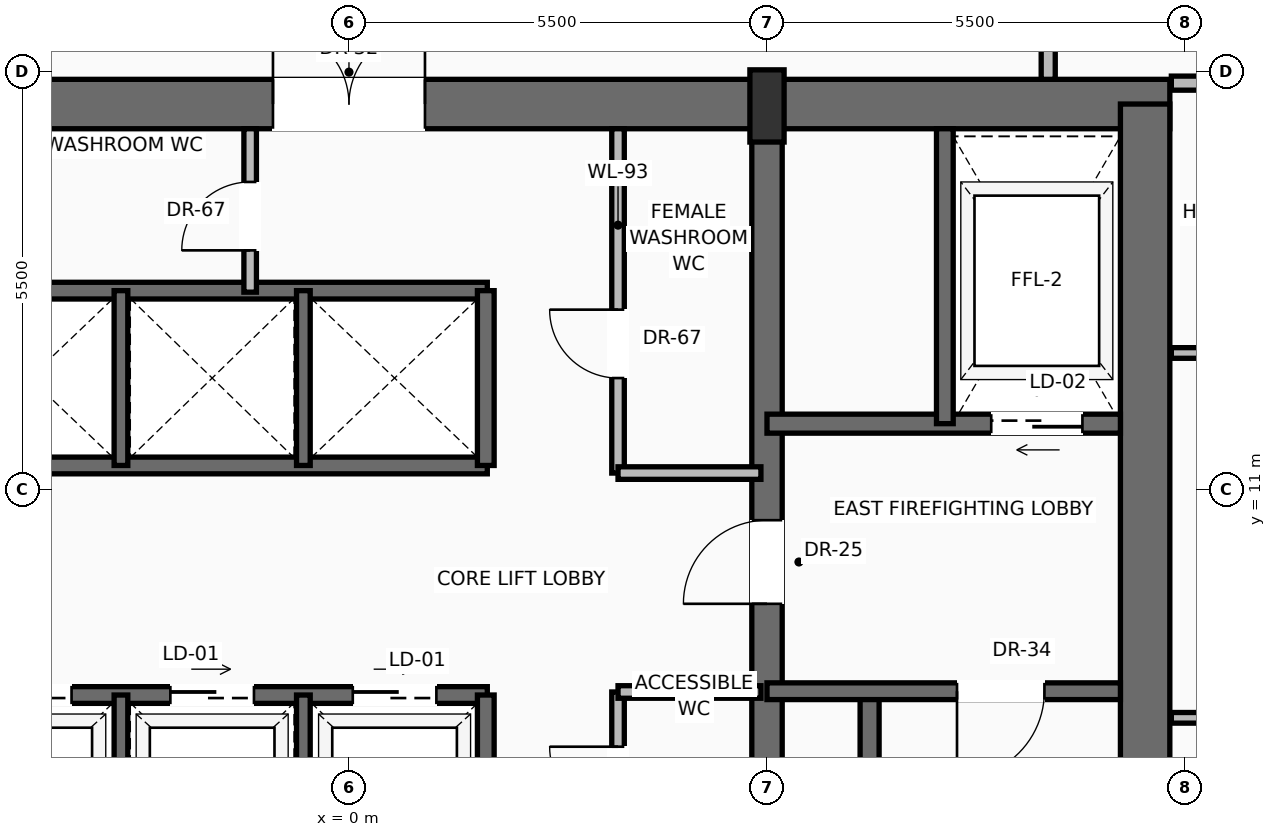
"""IFC4 building model, lengths in metres.
Left out: names, types, materials, properties, quantities, classifications, styles, units other than length and angle.
Written with IfcOpenShell. Run it as: python <this file> out.ifc"""

import sys

from ifc_helpers import new_model, si_unit, direction, frame, frame_2d, origin, origin_2d, place, context, subcontext, project, spatial, rectangle, extrude, source, transform, mapped, element, fill, save


model = new_model("IFC4")
c1 = context("Model", 3, precision=1e-05, world=origin(), true_north=direction((0.0, 1.0)))
c2 = subcontext(c1, "Body", "Model", "MODEL_VIEW")
j1 = project(units=[si_unit("LENGTHUNIT", "METRE"), si_unit("PLANEANGLEUNIT", "RADIAN")], contexts=[c1])
p1 = place(None, origin())
s1 = spatial("IfcSite", under=j1, at=p1, CompositionType="ELEMENT")
p2 = place(p1, origin())
s2 = spatial("IfcBuilding", under=s1, at=p2, CompositionType="ELEMENT")
p3 = place(p2, frame((0.0, 0.0, 208.0)))
s3 = spatial("IfcBuildingStorey", under=s2, at=p3, CompositionType="ELEMENT", Elevation=208.0)
p4 = place(p3, frame((-10.8, 16.075, 0.0), z_axis=(0.0, 0.0, 1.0), x_axis=(1.0, 0.0, 0.0)))
e1 = element("IfcWall", 1, at=p4, inside=s3, PredefinedType="SHEAR", context=c2, shape_type="SweptSolid", body=[
    extrude(rectangle(XDim=21.6, YDim=0.65, at=frame_2d((10.8, 0.0))), origin(), (0.0, 0.0, 1.0), 3.47),
])
p5 = place(p4, frame((3.37, 0.0, 0.0)))
e2 = element("IfcOpeningElement", 2, at=p5, cuts=e1, PredefinedType="OPENING", context=c2, shape_type="SweptSolid", body=[
    extrude(rectangle(XDim=1.3, YDim=2.3, at=frame_2d((0.65, 1.15))), frame((0.0, 0.335, 0.0), z_axis=(0.0, -1.0, 0.0), x_axis=(1.0, 0.0, 0.0)), (0.0, 0.0, 1.0), 0.67),
])
p6 = place(p4, frame((9.8, 0.0, 0.0)))
e3 = element("IfcOpeningElement", 3, at=p6, cuts=e1, PredefinedType="OPENING", context=c2, shape_type="SweptSolid", body=[
    extrude(rectangle(XDim=2.0, YDim=2.4, at=frame_2d((1.0, 1.2))), frame((0.0, 0.335, 0.0), z_axis=(0.0, -1.0, 0.0), x_axis=(1.0, 0.0, 0.0)), (0.0, 0.0, 1.0), 0.67),
])
p7 = place(p3, frame((10.475, 0.525, 0.0), z_axis=(0.0, 0.0, 1.0), x_axis=(0.0, 1.0, 0.0)))
e4 = element("IfcWall", 4, at=p7, inside=s3, PredefinedType="SHEAR", context=c2, shape_type="SweptSolid", body=[
    extrude(rectangle(XDim=15.55, YDim=0.65, at=frame_2d((7.775, 0.0))), origin(), (0.0, 0.0, 1.0), 3.47),
])
p8 = place(p3, frame((5.5, 0.525, 0.0), z_axis=(0.0, 0.0, 1.0), x_axis=(0.0, 1.0, 0.0)))
e5 = element("IfcWall", 5, at=p8, inside=s3, PredefinedType="SHEAR", context=c2, shape_type="SweptSolid", body=[
    extrude(rectangle(XDim=15.55, YDim=0.4, at=frame_2d((7.775, 0.0))), origin(), (0.0, 0.0, 1.0), 3.47),
])
p9 = place(p8, frame((8.975, 0.0, 0.0)))
e6 = element("IfcOpeningElement", 6, at=p9, cuts=e5, PredefinedType="OPENING", context=c2, shape_type="SweptSolid", body=[
    extrude(rectangle(XDim=1.1, YDim=2.2, at=frame_2d((0.55, 1.1))), frame((0.0, 0.21, 0.0), z_axis=(0.0, -1.0, 0.0), x_axis=(1.0, 0.0, 0.0)), (0.0, 0.0, 1.0), 0.42),
])
m1 = source(origin(), c2, "Body", "SweptSolid", [
    extrude(rectangle(XDim=0.45, YDim=0.95, at=origin_2d()), origin(), (0.0, 0.0, 1.0), 3.7),
])
p10 = place(p3, frame((5.5, 16.05, 0.0), z_axis=(0.0, 0.0, 1.0), x_axis=(1.0, 0.0, 0.0)))
e7 = element("IfcColumn", 7, at=p10, inside=s3, PredefinedType="PILASTER", context=c2, shape_type="MappedRepresentation", body=[
    mapped(m1, transform((0.0, 0.0, 0.0), scale=1.0)),
])
p11 = place(p3, frame((9.318, 32.292, 0.0), z_axis=(0.0, 0.0, 1.0), x_axis=(0.532974477416, -0.846131317482, 0.0)))
e8 = element("IfcWall", 8, at=p11, inside=s3, PredefinedType="SOLIDWALL", context=c2, shape_type="SweptSolid", body=[
    extrude(rectangle(XDim=19.199, YDim=0.28, at=frame_2d((9.599, 0.0))), origin(), (0.0, 0.0, 1.0), 3.05),
])
p12 = place(p11, frame((4.608, 0.0, 0.0)))
e9 = element("IfcOpeningElement", 9, at=p12, cuts=e8, PredefinedType="OPENING", context=c2, shape_type="SweptSolid", body=[
    extrude(rectangle(XDim=1.6, YDim=2.35, at=frame_2d((0.8, 1.175))), frame((0.0, 0.15, 0.0), z_axis=(0.0, -1.0, 0.0), x_axis=(1.0, 0.0, 0.0)), (0.0, 0.0, 1.0), 0.3),
])
p13 = place(p11, frame((13.055, 0.0, 0.9)))
e10 = element("IfcOpeningElement", 10, at=p13, cuts=e8, PredefinedType="OPENING", context=c2, shape_type="SweptSolid", body=[
    extrude(rectangle(XDim=1.55, YDim=1.85, at=frame_2d((0.775, 0.925))), frame((0.0, 0.15, 0.0), z_axis=(0.0, -1.0, 0.0), x_axis=(1.0, 0.0, 0.0)), (0.0, 0.0, 1.0), 0.3),
])
p14 = place(p3, frame((6.85, 0.85, 0.0), z_axis=(0.0, 0.0, 1.0), x_axis=(0.0, 1.0, 0.0)))
e11 = element("IfcWall", 11, at=p14, inside=s3, PredefinedType="SOLIDWALL", context=c2, shape_type="SweptSolid", body=[
    extrude(rectangle(XDim=7.5, YDim=0.25, at=frame_2d((3.75, 0.0))), origin(), (0.0, 0.0, 1.0), 3.47),
])
p15 = place(p3, frame((10.15, 8.35, 0.0), z_axis=(0.0, 0.0, 1.0), x_axis=(-1.0, 0.0, 0.0)))
e12 = element("IfcWall", 12, at=p15, inside=s3, PredefinedType="SOLIDWALL", context=c2, shape_type="SweptSolid", body=[
    extrude(rectangle(XDim=4.65, YDim=0.22, at=frame_2d((2.325, 0.0))), origin(), (0.0, 0.0, 1.0), 3.47),
])
p16 = place(p15, frame((1.0, 0.0, 0.0)))
e13 = element("IfcOpeningElement", 13, at=p16, cuts=e12, PredefinedType="OPENING", context=c2, shape_type="SweptSolid", body=[
    extrude(rectangle(XDim=1.15, YDim=2.2, at=frame_2d((0.575, 1.1))), frame((0.0, 0.12, 0.0), z_axis=(0.0, -1.0, 0.0), x_axis=(1.0, 0.0, 0.0)), (0.0, 0.0, 1.0), 0.24),
])
p17 = place(p3, frame((10.15, 11.87, 0.0), z_axis=(0.0, 0.0, 1.0), x_axis=(-1.0, 0.0, 0.0)))
e14 = element("IfcWall", 14, at=p17, inside=s3, PredefinedType="SOLIDWALL", context=c2, shape_type="SweptSolid", body=[
    extrude(rectangle(XDim=4.65, YDim=0.25, at=frame_2d((2.325, 0.0))), origin(), (0.0, 0.0, 1.0), 3.47),
])
p18 = place(p17, frame((0.5, 0.0, 0.0)))
e15 = element("IfcOpeningElement", 15, at=p18, cuts=e14, PredefinedType="OPENING", context=c2, shape_type="SweptSolid", body=[
    extrude(rectangle(XDim=1.2, YDim=2.25, at=frame_2d((0.6, 1.125))), frame((0.0, 0.135, 0.0), z_axis=(0.0, -1.0, 0.0), x_axis=(1.0, 0.0, 0.0)), (0.0, 0.0, 1.0), 0.27),
])
p19 = place(p3, frame((7.84, 11.87, 0.0), z_axis=(0.0, 0.0, 1.0), x_axis=(0.0, 1.0, 0.0)))
e16 = element("IfcWall", 16, at=p19, inside=s3, PredefinedType="SOLIDWALL", context=c2, shape_type="SweptSolid", body=[
    extrude(rectangle(XDim=3.88, YDim=0.22, at=frame_2d((1.94, 0.0))), origin(), (0.0, 0.0, 1.0), 3.47),
])
p20 = place(p3, frame((3.54, 6.0, 0.0), z_axis=(0.0, 0.0, 1.0), x_axis=(0.0, 1.0, 0.0)))
e17 = element("IfcWall", 17, at=p20, inside=s3, PredefinedType="PARTITIONING", context=c2, shape_type="SweptSolid", body=[
    extrude(rectangle(XDim=2.34, YDim=0.165, at=frame_2d((1.17, 0.0))), origin(), (0.0, 0.0, 1.0), 3.462),
])
p21 = place(p20, frame((0.72, 0.0, 0.0)))
e18 = element("IfcOpeningElement", 18, at=p21, cuts=e17, PredefinedType="OPENING", context=c2, shape_type="SweptSolid", body=[
    extrude(rectangle(XDim=0.9, YDim=2.1, at=frame_2d((0.45, 1.05))), frame((0.0, 0.093, 0.0), z_axis=(0.0, -1.0, 0.0), x_axis=(1.0, 0.0, 0.0)), (0.0, 0.0, 1.0), 0.185),
])
p22 = place(p3, frame((3.54, 8.34, 0.0), z_axis=(0.0, 0.0, 1.0), x_axis=(1.0, 0.0, 0.0)))
e19 = element("IfcWall", 19, at=p22, inside=s3, PredefinedType="PARTITIONING", context=c2, shape_type="SweptSolid", body=[
    extrude(rectangle(XDim=1.88, YDim=0.165, at=frame_2d((0.94, 0.0))), origin(), (0.0, 0.0, 1.0), 3.462),
])
p23 = place(p3, frame((-5.5, 8.3, 0.0), z_axis=(0.0, 0.0, 1.0), x_axis=(1.0, 0.0, 0.0)))
e20 = element("IfcWall", 20, at=p23, inside=s3, PredefinedType="SOLIDWALL", context=c2, shape_type="SweptSolid", body=[
    extrude(rectangle(XDim=7.32, YDim=0.22, at=frame_2d((3.66, 0.0))), origin(), (0.0, 0.0, 1.0), 3.47),
])
p24 = place(p23, frame((0.75, 0.0, 0.0)))
e21 = element("IfcOpeningElement", 21, at=p24, cuts=e20, PredefinedType="OPENING", context=c2, shape_type="SweptSolid", body=[
    extrude(rectangle(XDim=1.1, YDim=2.2, at=frame_2d((0.55, 1.1))), frame((0.0, 0.12, 0.0), z_axis=(0.0, -1.0, 0.0), x_axis=(1.0, 0.0, 0.0)), (0.0, 0.0, 1.0), 0.24),
])
p25 = place(p23, frame((3.15, 0.0, 0.0)))
e22 = element("IfcOpeningElement", 22, at=p25, cuts=e20, PredefinedType="OPENING", context=c2, shape_type="SweptSolid", body=[
    extrude(rectangle(XDim=1.1, YDim=2.2, at=frame_2d((0.55, 1.1))), frame((0.0, 0.12, 0.0), z_axis=(0.0, -1.0, 0.0), x_axis=(1.0, 0.0, 0.0)), (0.0, 0.0, 1.0), 0.24),
])
p26 = place(p23, frame((5.55, 0.0, 0.0)))
e23 = element("IfcOpeningElement", 23, at=p26, cuts=e20, PredefinedType="OPENING", context=c2, shape_type="SweptSolid", body=[
    extrude(rectangle(XDim=1.1, YDim=2.2, at=frame_2d((0.55, 1.1))), frame((0.0, 0.12, 0.0), z_axis=(0.0, -1.0, 0.0), x_axis=(1.0, 0.0, 0.0)), (0.0, 0.0, 1.0), 0.24),
])
p27 = place(p3, frame((1.8, 6.0, 0.0), z_axis=(0.0, 0.0, 1.0), x_axis=(0.0, 1.0, 0.0)))
e24 = element("IfcWall", 24, at=p27, inside=s3, PredefinedType="SOLIDWALL", context=c2, shape_type="SweptSolid", body=[
    extrude(rectangle(XDim=2.3, YDim=0.22, at=frame_2d((1.15, 0.0))), origin(), (0.0, 0.0, 1.0), 3.47),
])
for number, where, z_axis, x_axis in (
    (25, (-3.0, 6.0, 0.0), (0.0, 0.0, 1.0), (0.0, 1.0, 0.0)),
    (26, (-0.6, 6.0, 0.0), (0.0, 0.0, 1.0), (0.0, 1.0, 0.0)),
):
    element("IfcWall", number, at=place(p3, frame(where, z_axis=z_axis, x_axis=x_axis)), inside=s3, PredefinedType="SOLIDWALL", context=c2, shape_type="SweptSolid", body=[
        extrude(rectangle(XDim=2.3, YDim=0.18, at=frame_2d((1.15, 0.0))), origin(), (0.0, 0.0, 1.0), 3.47),
    ])
for number, where, z_axis, x_axis in (
    (27, (-5.5, 11.32, 0.0), (0.0, 0.0, 1.0), (1.0, 0.0, 0.0)),
    (28, (-5.5, 13.62, 0.0), (0.0, 0.0, 1.0), (1.0, 0.0, 0.0)),
):
    element("IfcWall", number, at=place(p3, frame(where, z_axis=z_axis, x_axis=x_axis)), inside=s3, PredefinedType="SOLIDWALL", context=c2, shape_type="SweptSolid", body=[
        extrude(rectangle(XDim=7.32, YDim=0.22, at=frame_2d((3.66, 0.0))), origin(), (0.0, 0.0, 1.0), 3.47),
    ])
p28 = place(p3, frame((1.8, 11.32, 0.0), z_axis=(0.0, 0.0, 1.0), x_axis=(0.0, 1.0, 0.0)))
e29 = element("IfcWall", 29, at=p28, inside=s3, PredefinedType="SOLIDWALL", context=c2, shape_type="SweptSolid", body=[
    extrude(rectangle(XDim=2.3, YDim=0.22, at=frame_2d((1.15, 0.0))), origin(), (0.0, 0.0, 1.0), 3.47),
])
for number, where, z_axis, x_axis in (
    (30, (-3.0, 11.32, 0.0), (0.0, 0.0, 1.0), (0.0, 1.0, 0.0)),
    (31, (-0.6, 11.32, 0.0), (0.0, 0.0, 1.0), (0.0, 1.0, 0.0)),
):
    element("IfcWall", number, at=place(p3, frame(where, z_axis=z_axis, x_axis=x_axis)), inside=s3, PredefinedType="SOLIDWALL", context=c2, shape_type="SweptSolid", body=[
        extrude(rectangle(XDim=2.3, YDim=0.18, at=frame_2d((1.15, 0.0))), origin(), (0.0, 0.0, 1.0), 3.47),
    ])
p29 = place(p3, frame((-1.3, 13.6, 0.0), z_axis=(0.0, 0.0, 1.0), x_axis=(0.0, 1.0, 0.0)))
e32 = element("IfcWall", 32, at=p29, inside=s3, PredefinedType="PARTITIONING", context=c2, shape_type="SweptSolid", body=[
    extrude(rectangle(XDim=2.15, YDim=0.165, at=frame_2d((1.075, 0.0))), origin(), (0.0, 0.0, 1.0), 3.462),
])
p30 = place(p29, frame((0.55, 0.0, 0.0)))
e33 = element("IfcOpeningElement", 33, at=p30, cuts=e32, PredefinedType="OPENING", context=c2, shape_type="SweptSolid", body=[
    extrude(rectangle(XDim=0.9, YDim=2.1, at=frame_2d((0.45, 1.05))), frame((0.0, 0.093, 0.0), z_axis=(0.0, -1.0, 0.0), x_axis=(1.0, 0.0, 0.0)), (0.0, 0.0, 1.0), 0.185),
])
p31 = place(p3, frame((3.54, 11.22, 0.0), z_axis=(0.0, 0.0, 1.0), x_axis=(0.0, 1.0, 0.0)))
e34 = element("IfcWall", 34, at=p31, inside=s3, PredefinedType="PARTITIONING", context=c2, shape_type="SweptSolid", body=[
    extrude(rectangle(XDim=4.53, YDim=0.165, at=frame_2d((2.265, 0.0))), origin(), (0.0, 0.0, 1.0), 3.462),
])
p32 = place(p31, frame((1.25, 0.0, 0.0)))
e35 = element("IfcOpeningElement", 35, at=p32, cuts=e34, PredefinedType="OPENING", context=c2, shape_type="SweptSolid", body=[
    extrude(rectangle(XDim=0.9, YDim=2.1, at=frame_2d((0.45, 1.05))), frame((0.0, 0.093, 0.0), z_axis=(0.0, -1.0, 0.0), x_axis=(1.0, 0.0, 0.0)), (0.0, 0.0, 1.0), 0.185),
])
p33 = place(p3, frame((3.54, 11.22, 0.0), z_axis=(0.0, 0.0, 1.0), x_axis=(1.0, 0.0, 0.0)))
e36 = element("IfcWall", 36, at=p33, inside=s3, PredefinedType="PARTITIONING", context=c2, shape_type="SweptSolid", body=[
    extrude(rectangle(XDim=1.88, YDim=0.165, at=frame_2d((0.94, 0.0))), origin(), (0.0, 0.0, 1.0), 3.462),
])
p34 = place(p3, frame((9.2, 16.4, 0.0), z_axis=(0.0, 0.0, 1.0), x_axis=(0.0, 1.0, 0.0)))
e37 = element("IfcWall", 37, at=p34, inside=s3, PredefinedType="PARTITIONING", context=c2, shape_type="SweptSolid", body=[
    extrude(rectangle(XDim=7.4, YDim=0.185, at=frame_2d((3.7, 0.0))), origin(), (0.0, 0.0, 1.0), 3.462),
])
p35 = place(p34, frame((3.561, 0.0, 0.0)))
e38 = element("IfcOpeningElement", 38, at=p35, cuts=e37, PredefinedType="OPENING", context=c2, shape_type="SweptSolid", body=[
    extrude(rectangle(XDim=0.95, YDim=2.2, at=frame_2d((0.475, 1.1))), frame((0.0, 0.103, 0.0), z_axis=(0.0, -1.0, 0.0), x_axis=(1.0, 0.0, 0.0)), (0.0, 0.0, 1.0), 0.205),
])
p36 = place(p34, frame((1.457, 0.0, 0.0)))
e39 = element("IfcOpeningElement", 39, at=p36, cuts=e37, PredefinedType="OPENING", context=c2, shape_type="SweptSolid", body=[
    extrude(rectangle(XDim=0.95, YDim=2.2, at=frame_2d((0.475, 1.1))), frame((0.0, 0.103, 0.0), z_axis=(0.0, -1.0, 0.0), x_axis=(1.0, 0.0, 0.0)), (0.0, 0.0, 1.0), 0.205),
])
p37 = place(p3, frame((10.82, 16.35, 0.0), z_axis=(0.0, 0.0, 1.0), x_axis=(1.0, 0.0, 0.0)))
e40 = element("IfcWall", 40, at=p37, inside=s3, PredefinedType="PARTITIONING", context=c2, shape_type="SweptSolid", body=[
    extrude(rectangle(XDim=8.693, YDim=0.185, at=frame_2d((4.347, 0.0))), origin(), (0.0, 0.0, 1.0), 3.462),
])
p38 = place(p37, frame((2.67, 0.0, 0.0)))
e41 = element("IfcOpeningElement", 41, at=p38, cuts=e40, PredefinedType="OPENING", context=c2, shape_type="SweptSolid", body=[
    extrude(rectangle(XDim=0.95, YDim=2.2, at=frame_2d((0.475, 1.1))), frame((0.0, 0.103, 0.0), z_axis=(0.0, -1.0, 0.0), x_axis=(1.0, 0.0, 0.0)), (0.0, 0.0, 1.0), 0.205),
])
p39 = place(p3, frame((10.82, 8.0, 0.0), z_axis=(0.0, 0.0, 1.0), x_axis=(1.0, 0.0, 0.0)))
e42 = element("IfcWall", 42, at=p39, inside=s3, PredefinedType="PARTITIONING", context=c2, shape_type="SweptSolid", body=[
    extrude(rectangle(XDim=13.953, YDim=0.14, at=frame_2d((6.976, 0.0))), origin(), (0.0, 0.0, 1.0), 3.462),
])
p40 = place(p39, frame((6.494, 0.0, 0.0)))
e43 = element("IfcOpeningElement", 43, at=p40, cuts=e42, PredefinedType="OPENING", context=c2, shape_type="SweptSolid", body=[
    extrude(rectangle(XDim=0.95, YDim=2.2, at=frame_2d((0.475, 1.1))), frame((0.0, 0.08, 0.0), z_axis=(0.0, -1.0, 0.0), x_axis=(1.0, 0.0, 0.0)), (0.0, 0.0, 1.0), 0.16),
])
p41 = place(p3, frame((10.82, 12.8, 0.0), z_axis=(0.0, 0.0, 1.0), x_axis=(1.0, 0.0, 0.0)))
e44 = element("IfcWall", 44, at=p41, inside=s3, PredefinedType="PARTITIONING", context=c2, shape_type="SweptSolid", body=[
    extrude(rectangle(XDim=10.929, YDim=0.14, at=frame_2d((5.465, 0.0))), origin(), (0.0, 0.0, 1.0), 3.462),
])
p42 = place(p41, frame((4.982, 0.0, 0.0)))
e45 = element("IfcOpeningElement", 45, at=p42, cuts=e44, PredefinedType="OPENING", context=c2, shape_type="SweptSolid", body=[
    extrude(rectangle(XDim=0.95, YDim=2.2, at=frame_2d((0.475, 1.1))), frame((0.0, 0.08, 0.0), z_axis=(0.0, -1.0, 0.0), x_axis=(1.0, 0.0, 0.0)), (0.0, 0.0, 1.0), 0.16),
])
m2 = source(origin(), c2, "Body", "SweptSolid", [
    extrude(rectangle(XDim=1.15, YDim=2.2, at=frame_2d((0.575, 1.1))), frame((0.0, 0.025, 0.0), z_axis=(0.0, -1.0, 0.0), x_axis=(1.0, 0.0, 0.0)), (0.0, 0.0, 1.0), 0.05),
])
p43 = place(p16, origin())
e46 = element("IfcDoor", 46, at=p43, inside=s3, OperationType="SINGLE_SWING_RIGHT", PredefinedType="DOOR", context=c2, shape_type="MappedRepresentation", body=[
    mapped(m2, transform((0.0, 0.0, 0.0), scale=1.0)),
])
fill(e13, e46)
m3 = source(origin(), c2, "Body", "SweptSolid", [
    extrude(rectangle(XDim=1.1, YDim=2.2, at=frame_2d((0.55, 1.1))), frame((0.0, 0.025, 0.0), z_axis=(0.0, -1.0, 0.0), x_axis=(1.0, 0.0, 0.0)), (0.0, 0.0, 1.0), 0.05),
])
p44 = place(p9, origin())
e47 = element("IfcDoor", 47, at=p44, inside=s3, OperationType="SINGLE_SWING_LEFT", PredefinedType="DOOR", context=c2, shape_type="MappedRepresentation", body=[
    mapped(m3, transform((0.0, 0.0, 0.0), scale=1.0)),
])
fill(e6, e47)
m4 = source(origin(), c2, "Body", "SweptSolid", [
    extrude(rectangle(XDim=1.2, YDim=2.25, at=frame_2d((0.6, 1.125))), frame((0.0, 0.025, 0.0), z_axis=(0.0, -1.0, 0.0), x_axis=(1.0, 0.0, 0.0)), (0.0, 0.0, 1.0), 0.05),
])
p45 = place(p18, origin())
e48 = element("IfcDoor", 48, at=p45, inside=s3, OperationType="SLIDING_TO_RIGHT", PredefinedType="DOOR", context=c2, shape_type="MappedRepresentation", body=[
    mapped(m4, transform((0.0, 0.0, 0.0), scale=1.0)),
])
fill(e15, e48)
m5 = source(origin(), c2, "Body", "SweptSolid", [
    extrude(rectangle(XDim=2.0, YDim=2.4, at=frame_2d((1.0, 1.2))), frame((0.0, 0.025, 0.0), z_axis=(0.0, -1.0, 0.0), x_axis=(1.0, 0.0, 0.0)), (0.0, 0.0, 1.0), 0.05),
])
p46 = place(p6, origin())
e49 = element("IfcDoor", 49, at=p46, inside=s3, OperationType="DOUBLE_DOOR_SINGLE_SWING", PredefinedType="DOOR", context=c2, shape_type="MappedRepresentation", body=[
    mapped(m5, transform((0.0, 0.0, 0.0), scale=1.0)),
])
fill(e3, e49)
m6 = source(origin(), c2, "Body", "SweptSolid", [
    extrude(rectangle(XDim=0.9, YDim=2.1, at=frame_2d((0.45, 1.05))), frame((0.0, 0.025, 0.0), z_axis=(0.0, -1.0, 0.0), x_axis=(1.0, 0.0, 0.0)), (0.0, 0.0, 1.0), 0.05),
])
p47 = place(p21, origin())
e50 = element("IfcDoor", 50, at=p47, inside=s3, OperationType="SINGLE_SWING_RIGHT", PredefinedType="DOOR", context=c2, shape_type="MappedRepresentation", body=[
    mapped(m6, transform((0.0, 0.0, 0.0), scale=1.0)),
])
fill(e18, e50)
m7 = source(origin(), c2, "Body", "SweptSolid", [
    extrude(rectangle(XDim=1.1, YDim=2.2, at=frame_2d((0.55, 1.1))), frame((0.0, 0.025, 0.0), z_axis=(0.0, -1.0, 0.0), x_axis=(1.0, 0.0, 0.0)), (0.0, 0.0, 1.0), 0.05),
])
p48 = place(p24, origin())
e51 = element("IfcDoor", 51, at=p48, inside=s3, OperationType="SLIDING_TO_LEFT", PredefinedType="DOOR", context=c2, shape_type="MappedRepresentation", body=[
    mapped(m7, transform((0.0, 0.0, 0.0), scale=1.0)),
])
fill(e21, e51)
p49 = place(p25, origin())
e52 = element("IfcDoor", 52, at=p49, inside=s3, OperationType="SLIDING_TO_LEFT", PredefinedType="DOOR", context=c2, shape_type="MappedRepresentation", body=[
    mapped(m7, transform((0.0, 0.0, 0.0), scale=1.0)),
])
fill(e22, e52)
p50 = place(p26, origin())
e53 = element("IfcDoor", 53, at=p50, inside=s3, OperationType="SLIDING_TO_LEFT", PredefinedType="DOOR", context=c2, shape_type="MappedRepresentation", body=[
    mapped(m7, transform((0.0, 0.0, 0.0), scale=1.0)),
])
fill(e23, e53)
p51 = place(p30, origin())
e54 = element("IfcDoor", 54, at=p51, inside=s3, OperationType="SINGLE_SWING_LEFT", PredefinedType="DOOR", context=c2, shape_type="MappedRepresentation", body=[
    mapped(m6, transform((0.0, 0.0, 0.0), scale=1.0)),
])
fill(e33, e54)
p52 = place(p32, origin())
e55 = element("IfcDoor", 55, at=p52, inside=s3, OperationType="SINGLE_SWING_RIGHT", PredefinedType="DOOR", context=c2, shape_type="MappedRepresentation", body=[
    mapped(m6, transform((0.0, 0.0, 0.0), scale=1.0)),
])
fill(e35, e55)
save(model, sys.argv[1])
